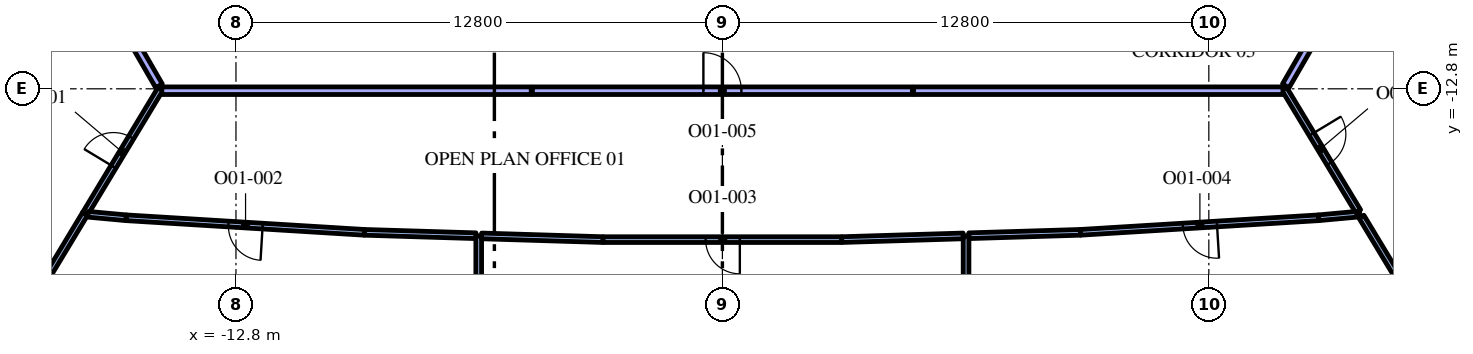
"""IFC4 building model, lengths in metres.
Left out: names, types, materials, properties, quantities, classifications, styles, units other than length and angle.
Written with IfcOpenShell. Run it as: python <this file> out.ifc"""

import sys

from ifc_helpers import new_model, si_unit, direction, frame, frame_2d, origin, place, context, subcontext, project, spatial, rectangle, extrude, element, fill, save


model = new_model("IFC4")
c1 = context("Model", 3, precision=1e-05, world=origin(), true_north=direction((0.0, 1.0)))
c2 = subcontext(c1, "Body", "Model", "MODEL_VIEW")
j1 = project(units=[si_unit("LENGTHUNIT", "METRE"), si_unit("PLANEANGLEUNIT", "RADIAN")], contexts=[c1])
p1 = place(None, origin())
s1 = spatial("IfcSite", under=j1, at=p1, CompositionType="ELEMENT")
p2 = place(p1, origin())
s2 = spatial("IfcBuilding", under=s1, at=p2, CompositionType="ELEMENT")
p3 = place(p2, frame((0.0, 0.0, 141.6)))
s3 = spatial("IfcBuildingStorey", under=s2, at=p3, CompositionType="ELEMENT", Elevation=141.6)
p4 = place(p3, frame((-16.771, -16.09, 0.0), z_axis=(0.0, 0.0, 1.0), x_axis=(-0.516817512045, -0.856095590015, 0.0)))
e1 = element("IfcWall", 1, at=p4, inside=s3, PredefinedType="PARTITIONING", context=c2, shape_type="SweptSolid", body=[
    extrude(rectangle(XDim=4.45, YDim=0.15, at=frame_2d((2.225, 0.0))), origin(), (0.0, 0.0, 1.0), 3.15),
])
p5 = place(p3, frame((-16.775, -16.097, 0.0), z_axis=(0.0, 0.0, 1.0), x_axis=(0.516793803756, 0.856109902057, 0.0)))
e2 = element("IfcWall", 2, at=p5, inside=s3, PredefinedType="PARTITIONING", context=c2, shape_type="SweptSolid", body=[
    extrude(rectangle(XDim=3.856, YDim=0.15, at=frame_2d((1.928, 0.0))), origin(), (0.0, 0.0, 1.0), 3.15),
])
p6 = place(p5, frame((1.456, 0.0, 0.0)))
e3 = element("IfcOpeningElement", 3, at=p6, cuts=e2, PredefinedType="OPENING", context=c2, shape_type="SweptSolid", body=[
    extrude(rectangle(XDim=0.9, YDim=2.1, at=frame_2d((0.45, 1.05))), frame((0.0, 0.085, 0.0), z_axis=(0.0, -1.0, 0.0), x_axis=(1.0, 0.0, 0.0)), (0.0, 0.0, 1.0), 0.17),
])
p7 = place(p3, frame((-25.421, -14.677, 0.0), z_axis=(0.0, 0.0, 1.0), x_axis=(0.866031435434, 0.499989552732, 0.0)))
e4 = element("IfcWall", 4, at=p7, inside=s3, PredefinedType="PARTITIONING", context=c2, shape_type="SweptSolid", body=[
    extrude(rectangle(XDim=10.154, YDim=0.2, at=frame_2d((5.077, 0.0))), origin(), (0.0, 0.0, 1.0), 3.15),
])
p8 = place(p3, frame((-16.578, -9.687, 0.0), z_axis=(0.0, 0.0, 1.0), x_axis=(0.499981686864, -0.86603597662, 0.0)))
e5 = element("IfcWall", 5, at=p8, inside=s3, PredefinedType="PARTITIONING", context=c2, shape_type="SweptSolid", body=[
    extrude(rectangle(XDim=3.506, YDim=0.2, at=frame_2d((1.753, 0.0))), origin(), (0.0, 0.0, 1.0), 3.15),
])
p9 = place(p3, frame((-6.412, -16.668, 0.0), z_axis=(0.0, 0.0, 1.0), x_axis=(0.0, -1.0, 0.0)))
e6 = element("IfcWall", 6, at=p9, inside=s3, PredefinedType="PARTITIONING", context=c2, shape_type="SweptSolid", body=[
    extrude(rectangle(XDim=4.002, YDim=0.15, at=frame_2d((2.001, 0.0))), origin(), (0.0, 0.0, 1.0), 3.15),
])
p10 = place(p3, frame((-16.69, -16.102, 0.0), z_axis=(0.0, 0.0, 1.0), x_axis=(0.995818997537, -0.091348366946, 0.0)))
e7 = element("IfcWall", 7, at=p10, inside=s3, PredefinedType="PARTITIONING", context=c2, shape_type="SweptSolid", body=[
    extrude(rectangle(XDim=1.002, YDim=0.15, at=frame_2d((0.501, 0.0))), origin(), (0.0, 0.0, 1.0), 3.15),
])
p11 = place(p3, frame((-9.421, -16.576, 0.0), z_axis=(0.0, 0.0, 1.0), x_axis=(-0.998137075468, 0.061011298754, 0.0)))
e8 = element("IfcWall", 8, at=p11, inside=s3, PredefinedType="PARTITIONING", context=c2, shape_type="SweptSolid", body=[
    extrude(rectangle(XDim=6.282, YDim=0.15, at=frame_2d((3.141, 0.0))), origin(), (0.0, 0.0, 1.0), 3.15),
])
p12 = place(p11, frame((2.683, 0.0, 0.0)))
e9 = element("IfcOpeningElement", 9, at=p12, cuts=e8, PredefinedType="OPENING", context=c2, shape_type="SweptSolid", body=[
    extrude(rectangle(XDim=0.9, YDim=2.1, at=frame_2d((0.45, 1.05))), frame((0.0, 0.085, 0.0), z_axis=(0.0, -1.0, 0.0), x_axis=(1.0, 0.0, 0.0)), (0.0, 0.0, 1.0), 0.17),
])
p13 = place(p3, frame((-9.421, -16.576, 0.0), z_axis=(0.0, 0.0, 1.0), x_axis=(0.999533978083, -0.030525835896, 0.0)))
e10 = element("IfcWall", 10, at=p13, inside=s3, PredefinedType="PARTITIONING", context=c2, shape_type="SweptSolid", body=[
    extrude(rectangle(XDim=2.935, YDim=0.15, at=frame_2d((1.468, 0.0))), origin(), (0.0, 0.0, 1.0), 3.15),
])
p14 = place(p3, frame((6.412, -16.668, 0.0), z_axis=(0.0, 0.0, 1.0), x_axis=(0.0, -1.0, 0.0)))
e11 = element("IfcWall", 11, at=p14, inside=s3, PredefinedType="PARTITIONING", context=c2, shape_type="SweptSolid", body=[
    extrude(rectangle(XDim=4.002, YDim=0.15, at=frame_2d((2.001, 0.0))), origin(), (0.0, 0.0, 1.0), 3.15),
])
p15 = place(p3, frame((-6.337, -16.671, 0.0), z_axis=(0.0, 0.0, 1.0), x_axis=(0.999533369646, -0.030545751995, 0.0)))
e12 = element("IfcWall", 12, at=p15, inside=s3, PredefinedType="PARTITIONING", context=c2, shape_type="SweptSolid", body=[
    extrude(rectangle(XDim=3.197, YDim=0.15, at=frame_2d((1.599, 0.0))), origin(), (0.0, 0.0, 1.0), 3.15),
])
p16 = place(p3, frame((3.141, -16.768, 0.0), z_axis=(0.0, 0.0, 1.0), x_axis=(-1.0, 0.0, 0.0)))
e13 = element("IfcWall", 13, at=p16, inside=s3, PredefinedType="PARTITIONING", context=c2, shape_type="SweptSolid", body=[
    extrude(rectangle(XDim=6.283, YDim=0.15, at=frame_2d((3.141, 0.0))), origin(), (0.0, 0.0, 1.0), 3.15),
])
p17 = place(p16, frame((2.683, 0.0, 0.0)))
e14 = element("IfcOpeningElement", 14, at=p17, cuts=e13, PredefinedType="OPENING", context=c2, shape_type="SweptSolid", body=[
    extrude(rectangle(XDim=0.9, YDim=2.1, at=frame_2d((0.45, 1.05))), frame((0.0, 0.085, 0.0), z_axis=(0.0, -1.0, 0.0), x_axis=(1.0, 0.0, 0.0)), (0.0, 0.0, 1.0), 0.17),
])
p18 = place(p3, frame((3.141, -16.768, 0.0), z_axis=(0.0, 0.0, 1.0), x_axis=(0.999533369646, 0.030545751995, 0.0)))
e15 = element("IfcWall", 15, at=p18, inside=s3, PredefinedType="PARTITIONING", context=c2, shape_type="SweptSolid", body=[
    extrude(rectangle(XDim=3.197, YDim=0.15, at=frame_2d((1.599, 0.0))), origin(), (0.0, 0.0, 1.0), 3.15),
])
p19 = place(p3, frame((6.487, -16.666, 0.0), z_axis=(0.0, 0.0, 1.0), x_axis=(0.999533978083, 0.030525835896, 0.0)))
e16 = element("IfcWall", 16, at=p19, inside=s3, PredefinedType="PARTITIONING", context=c2, shape_type="SweptSolid", body=[
    extrude(rectangle(XDim=2.935, YDim=0.15, at=frame_2d((1.468, 0.0))), origin(), (0.0, 0.0, 1.0), 3.15),
])
p20 = place(p3, frame((15.692, -16.193, 0.0), z_axis=(0.0, 0.0, 1.0), x_axis=(-0.998137075468, -0.061011298754, 0.0)))
e17 = element("IfcWall", 17, at=p20, inside=s3, PredefinedType="PARTITIONING", context=c2, shape_type="SweptSolid", body=[
    extrude(rectangle(XDim=6.282, YDim=0.15, at=frame_2d((3.141, 0.0))), origin(), (0.0, 0.0, 1.0), 3.15),
])
p21 = place(p20, frame((2.683, 0.0, 0.0)))
e18 = element("IfcOpeningElement", 18, at=p21, cuts=e17, PredefinedType="OPENING", context=c2, shape_type="SweptSolid", body=[
    extrude(rectangle(XDim=0.9, YDim=2.1, at=frame_2d((0.45, 1.05))), frame((0.0, 0.085, 0.0), z_axis=(0.0, -1.0, 0.0), x_axis=(1.0, 0.0, 0.0)), (0.0, 0.0, 1.0), 0.17),
])
p22 = place(p3, frame((15.692, -16.193, 0.0), z_axis=(0.0, 0.0, 1.0), x_axis=(0.995822859979, 0.091306251389, 0.0)))
e19 = element("IfcWall", 19, at=p22, inside=s3, PredefinedType="PARTITIONING", context=c2, shape_type="SweptSolid", body=[
    extrude(rectangle(XDim=1.086, YDim=0.15, at=frame_2d((0.543, 0.0))), origin(), (0.0, 0.0, 1.0), 3.15),
])
p23 = place(p3, frame((16.816, -16.165, 0.0), z_axis=(0.0, 0.0, 1.0), x_axis=(0.516814925326, -0.85609715159, 0.0)))
e20 = element("IfcWall", 20, at=p23, inside=s3, PredefinedType="PARTITIONING", context=c2, shape_type="SweptSolid", body=[
    extrude(rectangle(XDim=4.362, YDim=0.15, at=frame_2d((2.181, 0.0))), origin(), (0.0, 0.0, 1.0), 3.15),
])
p24 = place(p3, frame((14.782, -12.796, 0.0), z_axis=(0.0, 0.0, 1.0), x_axis=(0.516809076879, -0.856100682196, 0.0)))
e21 = element("IfcWall", 21, at=p24, inside=s3, PredefinedType="PARTITIONING", context=c2, shape_type="SweptSolid", body=[
    extrude(rectangle(XDim=3.768, YDim=0.15, at=frame_2d((1.884, 0.0))), origin(), (0.0, 0.0, 1.0), 3.15),
])
p25 = place(p24, frame((1.4, 0.0, 0.0)))
e22 = element("IfcOpeningElement", 22, at=p25, cuts=e21, PredefinedType="OPENING", context=c2, shape_type="SweptSolid", body=[
    extrude(rectangle(XDim=0.9, YDim=2.1, at=frame_2d((0.45, 1.05))), frame((0.0, 0.085, 0.0), z_axis=(0.0, -1.0, 0.0), x_axis=(1.0, 0.0, 0.0)), (0.0, 0.0, 1.0), 0.17),
])
p26 = place(p3, frame((-5.0, -12.85, 0.0), z_axis=(0.0, 0.0, 1.0), x_axis=(1.0, 0.0, 0.0)))
e23 = element("IfcWall", 23, at=p26, inside=s3, PredefinedType="PARTITIONING", context=c2, shape_type="SweptSolid", body=[
    extrude(rectangle(XDim=10.0, YDim=0.2, at=frame_2d((5.0, 0.0))), origin(), (0.0, 0.0, 1.0), 3.15),
])
p27 = place(p26, frame((4.5, 0.0, 0.0)))
e24 = element("IfcOpeningElement", 24, at=p27, cuts=e23, PredefinedType="OPENING", context=c2, shape_type="SweptSolid", body=[
    extrude(rectangle(XDim=1.0, YDim=2.1, at=frame_2d((0.5, 1.05))), frame((0.0, 0.11, 0.0), z_axis=(0.0, -1.0, 0.0), x_axis=(1.0, 0.0, 0.0)), (0.0, 0.0, 1.0), 0.22),
])
for number, where, z_axis, x_axis in (
    (25, (-14.751, -12.85, 0.0), (0.0, 0.0, 1.0), (1.0, 0.0, 0.0)),
    (26, (5.03, -12.85, 0.0), (0.0, 0.0, 1.0), (1.0, 0.0, 0.0)),
):
    element("IfcWall", number, at=place(p3, frame(where, z_axis=z_axis, x_axis=x_axis)), inside=s3, PredefinedType="PARTITIONING", context=c2, shape_type="SweptSolid", body=[
        extrude(rectangle(XDim=9.721, YDim=0.2, at=frame_2d((4.861, 0.0))), origin(), (0.0, 0.0, 1.0), 3.15),
    ])
p28 = place(p3, frame((16.628, -9.6, 0.0), z_axis=(0.0, 0.0, 1.0), x_axis=(0.866031435434, -0.499989552732, 0.0)))
e27 = element("IfcWall", 27, at=p28, inside=s3, PredefinedType="PARTITIONING", context=c2, shape_type="SweptSolid", body=[
    extrude(rectangle(XDim=10.154, YDim=0.2, at=frame_2d((5.077, 0.0))), origin(), (0.0, 0.0, 1.0), 3.15),
])
p29 = place(p3, frame((14.825, -12.722, 0.0), z_axis=(0.0, 0.0, 1.0), x_axis=(0.499981686864, 0.86603597662, 0.0)))
e28 = element("IfcWall", 28, at=p29, inside=s3, PredefinedType="PARTITIONING", context=c2, shape_type="SweptSolid", body=[
    extrude(rectangle(XDim=3.506, YDim=0.2, at=frame_2d((1.753, 0.0))), origin(), (0.0, 0.0, 1.0), 3.15),
])
p30 = place(p6, origin())
e29 = element("IfcDoor", 29, at=p30, inside=s3, OperationType="SINGLE_SWING_LEFT", PredefinedType="DOOR", context=c2, shape_type="SweptSolid", body=[
    extrude(rectangle(XDim=0.9, YDim=2.1, at=frame_2d((0.45, 1.05))), frame((0.0, 0.025, 0.0), z_axis=(0.0, -1.0, 0.0), x_axis=(1.0, 0.0, 0.0)), (0.0, 0.0, 1.0), 0.05),
])
fill(e3, e29)
p31 = place(p12, origin())
e30 = element("IfcDoor", 30, at=p31, inside=s3, OperationType="SINGLE_SWING_LEFT", PredefinedType="DOOR", context=c2, shape_type="SweptSolid", body=[
    extrude(rectangle(XDim=0.9, YDim=2.1, at=frame_2d((0.45, 1.05))), frame((0.0, 0.025, 0.0), z_axis=(0.0, -1.0, 0.0), x_axis=(1.0, 0.0, 0.0)), (0.0, 0.0, 1.0), 0.05),
])
fill(e9, e30)
p32 = place(p17, origin())
e31 = element("IfcDoor", 31, at=p32, inside=s3, OperationType="SINGLE_SWING_LEFT", PredefinedType="DOOR", context=c2, shape_type="SweptSolid", body=[
    extrude(rectangle(XDim=0.9, YDim=2.1, at=frame_2d((0.45, 1.05))), frame((0.0, 0.025, 0.0), z_axis=(0.0, -1.0, 0.0), x_axis=(1.0, 0.0, 0.0)), (0.0, 0.0, 1.0), 0.05),
])
fill(e14, e31)
p33 = place(p21, origin())
e32 = element("IfcDoor", 32, at=p33, inside=s3, OperationType="SINGLE_SWING_LEFT", PredefinedType="DOOR", context=c2, shape_type="SweptSolid", body=[
    extrude(rectangle(XDim=0.9, YDim=2.1, at=frame_2d((0.45, 1.05))), frame((0.0, 0.025, 0.0), z_axis=(0.0, -1.0, 0.0), x_axis=(1.0, 0.0, 0.0)), (0.0, 0.0, 1.0), 0.05),
])
fill(e18, e32)
p34 = place(p27, origin())
e33 = element("IfcDoor", 33, at=p34, inside=s3, OperationType="SINGLE_SWING_RIGHT", PredefinedType="DOOR", context=c2, shape_type="SweptSolid", body=[
    extrude(rectangle(XDim=1.0, YDim=2.1, at=frame_2d((0.5, 1.05))), frame((0.0, 0.025, 0.0), z_axis=(0.0, -1.0, 0.0), x_axis=(1.0, 0.0, 0.0)), (0.0, 0.0, 1.0), 0.05),
])
fill(e24, e33)
p35 = place(p25, origin())
e34 = element("IfcDoor", 34, at=p35, inside=s3, OperationType="SINGLE_SWING_LEFT", PredefinedType="DOOR", context=c2, shape_type="SweptSolid", body=[
    extrude(rectangle(XDim=0.9, YDim=2.1, at=frame_2d((0.45, 1.05))), frame((0.0, 0.025, 0.0), z_axis=(0.0, -1.0, 0.0), x_axis=(1.0, 0.0, 0.0)), (0.0, 0.0, 1.0), 0.05),
])
fill(e22, e34)
save(model, sys.argv[1])
